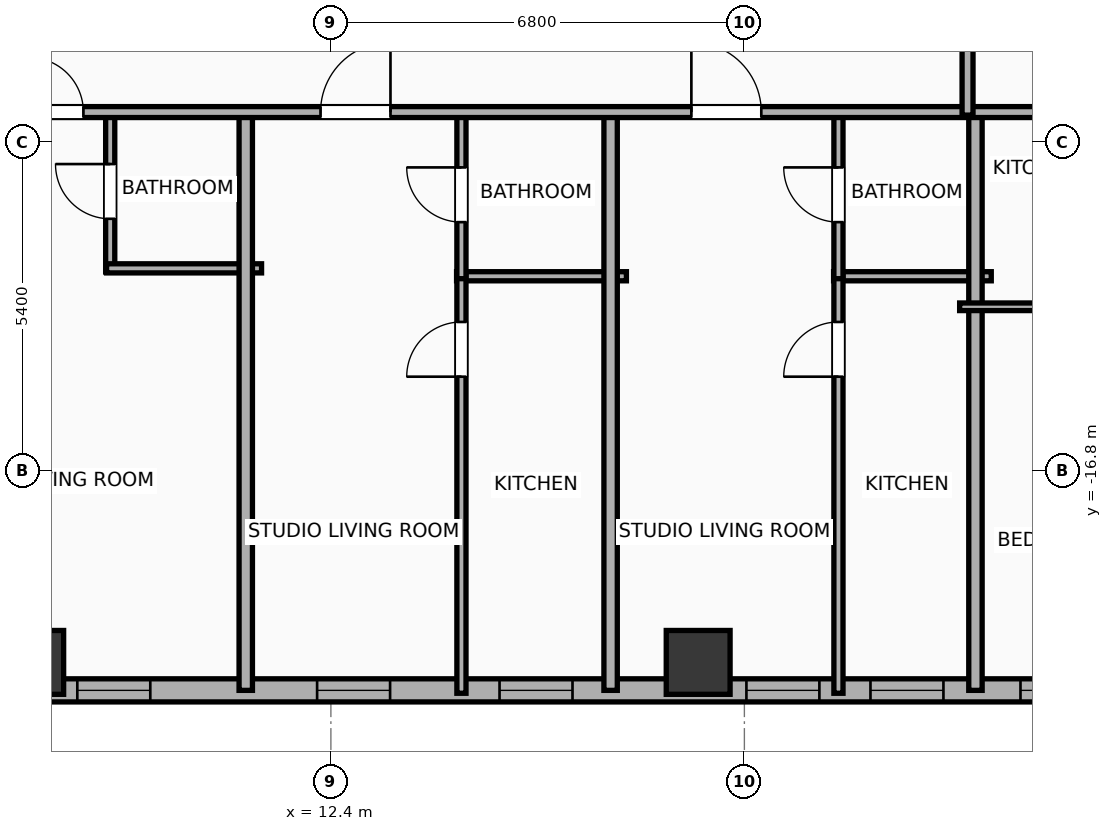
"""IFC4 building model, lengths in metres.
Left out: names, types, materials, properties, quantities, classifications, styles, units other than length and angle.
Written with IfcOpenShell. Run it as: python <this file> out.ifc"""

import sys

from ifc_helpers import new_model, si_unit, direction, frame, frame_2d, origin, origin_2d, place, context, subcontext, project, spatial, rectangle, hollow_rectangle, extrude, element, fill, save


model = new_model("IFC4")
c1 = context("Model", 3, precision=1e-05, world=origin(), true_north=direction((0.0, 1.0)))
c2 = subcontext(c1, "Body", "Model", "MODEL_VIEW")
j1 = project(units=[si_unit("LENGTHUNIT", "METRE"), si_unit("PLANEANGLEUNIT", "RADIAN")], contexts=[c1])
p1 = place(None, origin())
s1 = spatial("IfcSite", under=j1, at=p1, CompositionType="ELEMENT")
p2 = place(p1, origin())
s2 = spatial("IfcBuilding", under=s1, at=p2, CompositionType="ELEMENT")
p3 = place(p2, frame((0.0, 0.0, 89.7)))
s3 = spatial("IfcBuildingStorey", under=s2, at=p3, CompositionType="ELEMENT", Elevation=89.7)
for number, where, z_axis, x_axis in (
    (1, (7.48, -19.95, 0.0), (0.0, 0.0, 1.0), (1.0, 0.0, 0.0)),
    (2, (18.44, -19.95, 0.0), (0.0, 0.0, 1.0), (1.0, 0.0, 0.0)),
):
    element("IfcColumn", number, at=place(p3, frame(where, z_axis=z_axis, x_axis=x_axis)), inside=s3, PredefinedType="COLUMN", context=c2, shape_type="SweptSolid", body=[
        extrude(hollow_rectangle(XDim=1.05, YDim=1.05, WallThickness=0.036, at=origin_2d()), origin(), (0.0, 0.0, 1.0), 3.9),
    ])
p4 = place(p3, frame((29.381, -20.41, 0.0), z_axis=(0.0, 0.0, 1.0), x_axis=(-1.0, 0.0, 0.0)))
e3 = element("IfcWall", 3, at=p4, inside=s3, PredefinedType="ELEMENTEDWALL", context=c2, shape_type="SweptSolid", body=[
    extrude(rectangle(XDim=54.763, YDim=0.38, at=frame_2d((27.381, 0.0))), origin(), (0.0, 0.0, 1.0), 2.54),
])
p5 = place(p4, frame((48.367, 0.0, 0.75)))
e4 = element("IfcOpeningElement", 4, at=p5, cuts=e3, PredefinedType="OPENING", context=c2, shape_type="SweptSolid", body=[
    extrude(rectangle(XDim=2.4, YDim=1.63, at=frame_2d((1.2, 0.815))), frame((0.0, 0.2, 0.0), z_axis=(0.0, -1.0, 0.0), x_axis=(1.0, 0.0, 0.0)), (0.0, 0.0, 1.0), 0.4),
])
p6 = place(p4, frame((52.081, 0.0, 0.75)))
e5 = element("IfcOpeningElement", 5, at=p6, cuts=e3, PredefinedType="OPENING", context=c2, shape_type="SweptSolid", body=[
    extrude(rectangle(XDim=1.2, YDim=1.63, at=frame_2d((0.6, 0.815))), frame((0.0, 0.2, 0.0), z_axis=(0.0, -1.0, 0.0), x_axis=(1.0, 0.0, 0.0)), (0.0, 0.0, 1.0), 0.4),
])
p7 = place(p4, frame((45.486, 0.0, 0.75)))
e6 = element("IfcOpeningElement", 6, at=p7, cuts=e3, PredefinedType="OPENING", context=c2, shape_type="SweptSolid", body=[
    extrude(rectangle(XDim=1.2, YDim=1.63, at=frame_2d((0.6, 0.815))), frame((0.0, 0.2, 0.0), z_axis=(0.0, -1.0, 0.0), x_axis=(1.0, 0.0, 0.0)), (0.0, 0.0, 1.0), 0.4),
])
p8 = place(p4, frame((40.531, 0.0, 0.75)))
e7 = element("IfcOpeningElement", 7, at=p8, cuts=e3, PredefinedType="OPENING", context=c2, shape_type="SweptSolid", body=[
    extrude(rectangle(XDim=1.2, YDim=1.63, at=frame_2d((0.6, 0.815))), frame((0.0, 0.2, 0.0), z_axis=(0.0, -1.0, 0.0), x_axis=(1.0, 0.0, 0.0)), (0.0, 0.0, 1.0), 0.4),
])
p9 = place(p4, frame((33.686, 0.0, 0.75)))
e8 = element("IfcOpeningElement", 8, at=p9, cuts=e3, PredefinedType="OPENING", context=c2, shape_type="SweptSolid", body=[
    extrude(rectangle(XDim=1.2, YDim=1.63, at=frame_2d((0.6, 0.815))), frame((0.0, 0.2, 0.0), z_axis=(0.0, -1.0, 0.0), x_axis=(1.0, 0.0, 0.0)), (0.0, 0.0, 1.0), 0.4),
])
p10 = place(p4, frame((35.976, 0.0, 0.75)))
e9 = element("IfcOpeningElement", 9, at=p10, cuts=e3, PredefinedType="OPENING", context=c2, shape_type="SweptSolid", body=[
    extrude(rectangle(XDim=1.2, YDim=1.63, at=frame_2d((0.6, 0.815))), frame((0.0, 0.2, 0.0), z_axis=(0.0, -1.0, 0.0), x_axis=(1.0, 0.0, 0.0)), (0.0, 0.0, 1.0), 0.4),
])
p11 = place(p4, frame((28.805, 0.0, 0.75)))
e10 = element("IfcOpeningElement", 10, at=p11, cuts=e3, PredefinedType="OPENING", context=c2, shape_type="SweptSolid", body=[
    extrude(rectangle(XDim=1.2, YDim=1.63, at=frame_2d((0.6, 0.815))), frame((0.0, 0.2, 0.0), z_axis=(0.0, -1.0, 0.0), x_axis=(1.0, 0.0, 0.0)), (0.0, 0.0, 1.0), 0.4),
])
p12 = place(p4, frame((25.555, 0.0, 0.75)))
e11 = element("IfcOpeningElement", 11, at=p12, cuts=e3, PredefinedType="OPENING", context=c2, shape_type="SweptSolid", body=[
    extrude(rectangle(XDim=1.2, YDim=1.63, at=frame_2d((0.6, 0.815))), frame((0.0, 0.2, 0.0), z_axis=(0.0, -1.0, 0.0), x_axis=(1.0, 0.0, 0.0)), (0.0, 0.0, 1.0), 0.4),
])
p13 = place(p4, frame((19.951, 0.0, 0.75)))
e12 = element("IfcOpeningElement", 12, at=p13, cuts=e3, PredefinedType="OPENING", context=c2, shape_type="SweptSolid", body=[
    extrude(rectangle(XDim=1.2, YDim=1.63, at=frame_2d((0.6, 0.815))), frame((0.0, 0.2, 0.0), z_axis=(0.0, -1.0, 0.0), x_axis=(1.0, 0.0, 0.0)), (0.0, 0.0, 1.0), 0.4),
])
p14 = place(p4, frame((16.008, 0.0, 0.75)))
e13 = element("IfcOpeningElement", 13, at=p14, cuts=e3, PredefinedType="OPENING", context=c2, shape_type="SweptSolid", body=[
    extrude(rectangle(XDim=1.2, YDim=1.63, at=frame_2d((0.6, 0.815))), frame((0.0, 0.2, 0.0), z_axis=(0.0, -1.0, 0.0), x_axis=(1.0, 0.0, 0.0)), (0.0, 0.0, 1.0), 0.4),
])
p15 = place(p4, frame((13.008, 0.0, 0.75)))
e14 = element("IfcOpeningElement", 14, at=p15, cuts=e3, PredefinedType="OPENING", context=c2, shape_type="SweptSolid", body=[
    extrude(rectangle(XDim=1.2, YDim=1.63, at=frame_2d((0.6, 0.815))), frame((0.0, 0.2, 0.0), z_axis=(0.0, -1.0, 0.0), x_axis=(1.0, 0.0, 0.0)), (0.0, 0.0, 1.0), 0.4),
])
p16 = place(p4, frame((8.948, 0.0, 0.75)))
e15 = element("IfcOpeningElement", 15, at=p16, cuts=e3, PredefinedType="OPENING", context=c2, shape_type="SweptSolid", body=[
    extrude(rectangle(XDim=1.2, YDim=1.63, at=frame_2d((0.6, 0.815))), frame((0.0, 0.2, 0.0), z_axis=(0.0, -1.0, 0.0), x_axis=(1.0, 0.0, 0.0)), (0.0, 0.0, 1.0), 0.4),
])
p17 = place(p4, frame((6.908, 0.0, 0.75)))
e16 = element("IfcOpeningElement", 16, at=p17, cuts=e3, PredefinedType="OPENING", context=c2, shape_type="SweptSolid", body=[
    extrude(rectangle(XDim=1.2, YDim=1.63, at=frame_2d((0.6, 0.815))), frame((0.0, 0.2, 0.0), z_axis=(0.0, -1.0, 0.0), x_axis=(1.0, 0.0, 0.0)), (0.0, 0.0, 1.0), 0.4),
])
p18 = place(p4, frame((1.695, 0.0, 0.75)))
e17 = element("IfcOpeningElement", 17, at=p18, cuts=e3, PredefinedType="OPENING", context=c2, shape_type="SweptSolid", body=[
    extrude(rectangle(XDim=1.2, YDim=1.63, at=frame_2d((0.6, 0.815))), frame((0.0, 0.2, 0.0), z_axis=(0.0, -1.0, 0.0), x_axis=(1.0, 0.0, 0.0)), (0.0, 0.0, 1.0), 0.4),
])
p19 = place(p4, frame((4.441, 0.0, 0.75)))
e18 = element("IfcOpeningElement", 18, at=p19, cuts=e3, PredefinedType="OPENING", context=c2, shape_type="SweptSolid", body=[
    extrude(rectangle(XDim=1.2, YDim=1.63, at=frame_2d((0.6, 0.815))), frame((0.0, 0.2, 0.0), z_axis=(0.0, -1.0, 0.0), x_axis=(1.0, 0.0, 0.0)), (0.0, 0.0, 1.0), 0.4),
])
p20 = place(p3, frame((8.771, -13.53, 0.0), z_axis=(0.0, 0.0, 1.0), x_axis=(0.0, 1.0, 0.0)))
e19 = element("IfcWall", 19, at=p20, inside=s3, PredefinedType="PLUMBINGWALL", context=c2, shape_type="SweptSolid", body=[
    extrude(rectangle(XDim=2.65, YDim=0.15, at=frame_2d((1.325, 0.0))), origin(), (0.0, 0.0, 1.0), 3.65),
])
p21 = place(p20, frame((0.875, 0.0, 0.0)))
e20 = element("IfcOpeningElement", 20, at=p21, cuts=e19, PredefinedType="OPENING", context=c2, shape_type="SweptSolid", body=[
    extrude(rectangle(XDim=0.9, YDim=2.05, at=frame_2d((0.45, 1.025))), frame((0.0, 0.085, 0.0), z_axis=(0.0, -1.0, 0.0), x_axis=(1.0, 0.0, 0.0)), (0.0, 0.0, 1.0), 0.17),
])
p22 = place(p3, frame((8.711, -13.47, 0.0), z_axis=(0.0, 0.0, 1.0), x_axis=(1.0, 0.0, 0.0)))
e21 = element("IfcWall", 21, at=p22, inside=s3, PredefinedType="PLUMBINGWALL", context=c2, shape_type="SweptSolid", body=[
    extrude(rectangle(XDim=2.549, YDim=0.15, at=frame_2d((1.274, 0.0))), origin(), (0.0, 0.0, 1.0), 3.65),
])
p23 = place(p3, frame((11.0, -20.41, 0.0), z_axis=(0.0, 0.0, 1.0), x_axis=(0.0, 1.0, 0.0)))
e22 = element("IfcWall", 22, at=p23, inside=s3, PredefinedType="PARTITIONING", context=c2, shape_type="SweptSolid", body=[
    extrude(rectangle(XDim=9.59, YDim=0.22, at=frame_2d((4.795, 0.0))), origin(), (0.0, 0.0, 1.0), 3.65),
])
p24 = place(p3, frame((14.467, -13.6, 0.0), z_axis=(0.0, 0.0, 1.0), x_axis=(1.0, 0.0, 0.0)))
e23 = element("IfcWall", 23, at=p24, inside=s3, PredefinedType="PLUMBINGWALL", context=c2, shape_type="SweptSolid", body=[
    extrude(rectangle(XDim=2.793, YDim=0.15, at=frame_2d((1.396, 0.0))), origin(), (0.0, 0.0, 1.0), 3.65),
])
p25 = place(p3, frame((14.547, -20.458, 0.0), z_axis=(0.0, 0.0, 1.0), x_axis=(0.0, 1.0, 0.0)))
e24 = element("IfcWall", 24, at=p25, inside=s3, PredefinedType="PLUMBINGWALL", context=c2, shape_type="SweptSolid", body=[
    extrude(rectangle(XDim=6.897, YDim=0.15, at=frame_2d((3.449, 0.0))), origin(), (0.0, 0.0, 1.0), 3.65),
])
p26 = place(p25, frame((5.206, 0.0, 0.0)))
e25 = element("IfcOpeningElement", 25, at=p26, cuts=e24, PredefinedType="OPENING", context=c2, shape_type="SweptSolid", body=[
    extrude(rectangle(XDim=0.9, YDim=2.05, at=frame_2d((0.45, 1.025))), frame((0.0, 0.085, 0.0), z_axis=(0.0, -1.0, 0.0), x_axis=(1.0, 0.0, 0.0)), (0.0, 0.0, 1.0), 0.17),
])
p27 = place(p3, frame((14.547, -13.64, 0.0), z_axis=(0.0, 0.0, 1.0), x_axis=(0.0, 1.0, 0.0)))
e26 = element("IfcWall", 26, at=p27, inside=s3, PredefinedType="PLUMBINGWALL", context=c2, shape_type="SweptSolid", body=[
    extrude(rectangle(XDim=2.76, YDim=0.15, at=frame_2d((1.38, 0.0))), origin(), (0.0, 0.0, 1.0), 3.65),
])
p28 = place(p27, frame((0.93, 0.0, 0.0)))
e27 = element("IfcOpeningElement", 27, at=p28, cuts=e26, PredefinedType="OPENING", context=c2, shape_type="SweptSolid", body=[
    extrude(rectangle(XDim=0.9, YDim=2.05, at=frame_2d((0.45, 1.025))), frame((0.0, 0.085, 0.0), z_axis=(0.0, -1.0, 0.0), x_axis=(1.0, 0.0, 0.0)), (0.0, 0.0, 1.0), 0.17),
])
p29 = place(p3, frame((17.0, -20.41, 0.0), z_axis=(0.0, 0.0, 1.0), x_axis=(0.0, 1.0, 0.0)))
e28 = element("IfcWall", 28, at=p29, inside=s3, PredefinedType="PARTITIONING", context=c2, shape_type="SweptSolid", body=[
    extrude(rectangle(XDim=9.59, YDim=0.22, at=frame_2d((4.795, 0.0))), origin(), (0.0, 0.0, 1.0), 3.65),
])
p30 = place(p3, frame((20.667, -13.6, 0.0), z_axis=(0.0, 0.0, 1.0), x_axis=(1.0, 0.0, 0.0)))
e29 = element("IfcWall", 29, at=p30, inside=s3, PredefinedType="PLUMBINGWALL", context=c2, shape_type="SweptSolid", body=[
    extrude(rectangle(XDim=2.593, YDim=0.15, at=frame_2d((1.296, 0.0))), origin(), (0.0, 0.0, 1.0), 3.65),
])
p31 = place(p3, frame((20.747, -20.458, 0.0), z_axis=(0.0, 0.0, 1.0), x_axis=(0.0, 1.0, 0.0)))
e30 = element("IfcWall", 30, at=p31, inside=s3, PredefinedType="PLUMBINGWALL", context=c2, shape_type="SweptSolid", body=[
    extrude(rectangle(XDim=6.897, YDim=0.15, at=frame_2d((3.449, 0.0))), origin(), (0.0, 0.0, 1.0), 3.65),
])
p32 = place(p31, frame((5.206, 0.0, 0.0)))
e31 = element("IfcOpeningElement", 31, at=p32, cuts=e30, PredefinedType="OPENING", context=c2, shape_type="SweptSolid", body=[
    extrude(rectangle(XDim=0.9, YDim=2.05, at=frame_2d((0.45, 1.025))), frame((0.0, 0.085, 0.0), z_axis=(0.0, -1.0, 0.0), x_axis=(1.0, 0.0, 0.0)), (0.0, 0.0, 1.0), 0.17),
])
p33 = place(p3, frame((20.747, -13.64, 0.0), z_axis=(0.0, 0.0, 1.0), x_axis=(0.0, 1.0, 0.0)))
e32 = element("IfcWall", 32, at=p33, inside=s3, PredefinedType="PLUMBINGWALL", context=c2, shape_type="SweptSolid", body=[
    extrude(rectangle(XDim=2.76, YDim=0.15, at=frame_2d((1.38, 0.0))), origin(), (0.0, 0.0, 1.0), 3.65),
])
p34 = place(p33, frame((0.93, 0.0, 0.0)))
e33 = element("IfcOpeningElement", 33, at=p34, cuts=e32, PredefinedType="OPENING", context=c2, shape_type="SweptSolid", body=[
    extrude(rectangle(XDim=0.9, YDim=2.05, at=frame_2d((0.45, 1.025))), frame((0.0, 0.085, 0.0), z_axis=(0.0, -1.0, 0.0), x_axis=(1.0, 0.0, 0.0)), (0.0, 0.0, 1.0), 0.17),
])
p35 = place(p3, frame((23.0, -20.41, 0.0), z_axis=(0.0, 0.0, 1.0), x_axis=(0.0, 1.0, 0.0)))
e34 = element("IfcWall", 34, at=p35, inside=s3, PredefinedType="PARTITIONING", context=c2, shape_type="SweptSolid", body=[
    extrude(rectangle(XDim=9.59, YDim=0.22, at=frame_2d((4.795, 0.0))), origin(), (0.0, 0.0, 1.0), 3.65),
])
p36 = place(p3, frame((22.74, -14.102, 0.0), z_axis=(0.0, 0.0, 1.0), x_axis=(1.0, 0.0, 0.0)))
e35 = element("IfcWall", 35, at=p36, inside=s3, PredefinedType="PARTITIONING", context=c2, shape_type="SweptSolid", body=[
    extrude(rectangle(XDim=3.122, YDim=0.125, at=frame_2d((1.561, 0.0))), origin(), (0.0, 0.0, 1.0), 3.65),
])
p37 = place(p3, frame((-29.21, -10.9, 0.0), z_axis=(0.0, 0.0, 1.0), x_axis=(1.0, 0.0, 0.0)))
e36 = element("IfcWall", 36, at=p37, inside=s3, PredefinedType="PARTITIONING", context=c2, shape_type="SweptSolid", body=[
    extrude(rectangle(XDim=62.42, YDim=0.18, at=frame_2d((31.21, 0.0))), origin(), (0.0, 0.0, 1.0), 3.65),
])
p38 = place(p37, frame((3.108, 0.0, 0.0)))
e37 = element("IfcOpeningElement", 37, at=p38, cuts=e36, PredefinedType="OPENING", context=c2, shape_type="SweptSolid", body=[
    extrude(rectangle(XDim=1.15, YDim=2.05, at=frame_2d((0.575, 1.025))), frame((0.0, 0.1, 0.0), z_axis=(0.0, -1.0, 0.0), x_axis=(1.0, 0.0, 0.0)), (0.0, 0.0, 1.0), 0.2),
])
p39 = place(p37, frame((10.242, 0.0, 0.0)))
e38 = element("IfcOpeningElement", 38, at=p39, cuts=e36, PredefinedType="OPENING", context=c2, shape_type="SweptSolid", body=[
    extrude(rectangle(XDim=1.15, YDim=2.05, at=frame_2d((0.575, 1.025))), frame((0.0, 0.1, 0.0), z_axis=(0.0, -1.0, 0.0), x_axis=(1.0, 0.0, 0.0)), (0.0, 0.0, 1.0), 0.2),
])
p40 = place(p37, frame((17.14, 0.0, 0.0)))
e39 = element("IfcOpeningElement", 39, at=p40, cuts=e36, PredefinedType="OPENING", context=c2, shape_type="SweptSolid", body=[
    extrude(rectangle(XDim=0.9, YDim=2.05, at=frame_2d((0.45, 1.025))), frame((0.0, 0.1, 0.0), z_axis=(0.0, -1.0, 0.0), x_axis=(1.0, 0.0, 0.0)), (0.0, 0.0, 1.0), 0.2),
])
p41 = place(p37, frame((24.661, 0.0, 0.0)))
e40 = element("IfcOpeningElement", 40, at=p41, cuts=e36, PredefinedType="OPENING", context=c2, shape_type="SweptSolid", body=[
    extrude(rectangle(XDim=1.15, YDim=2.05, at=frame_2d((0.575, 1.025))), frame((0.0, 0.1, 0.0), z_axis=(0.0, -1.0, 0.0), x_axis=(1.0, 0.0, 0.0)), (0.0, 0.0, 1.0), 0.2),
])
p42 = place(p37, frame((28.644, 0.0, 0.0)))
e41 = element("IfcOpeningElement", 41, at=p42, cuts=e36, PredefinedType="OPENING", context=c2, shape_type="SweptSolid", body=[
    extrude(rectangle(XDim=1.15, YDim=2.05, at=frame_2d((0.575, 1.025))), frame((0.0, 0.1, 0.0), z_axis=(0.0, -1.0, 0.0), x_axis=(1.0, 0.0, 0.0)), (0.0, 0.0, 1.0), 0.2),
])
p43 = place(p37, frame((36.64, 0.0, 0.0)))
e42 = element("IfcOpeningElement", 42, at=p43, cuts=e36, PredefinedType="OPENING", context=c2, shape_type="SweptSolid", body=[
    extrude(rectangle(XDim=0.9, YDim=2.05, at=frame_2d((0.45, 1.025))), frame((0.0, 0.1, 0.0), z_axis=(0.0, -1.0, 0.0), x_axis=(1.0, 0.0, 0.0)), (0.0, 0.0, 1.0), 0.2),
])
p44 = place(p37, frame((41.44, 0.0, 0.0)))
e43 = element("IfcOpeningElement", 43, at=p44, cuts=e36, PredefinedType="OPENING", context=c2, shape_type="SweptSolid", body=[
    extrude(rectangle(XDim=1.15, YDim=2.05, at=frame_2d((0.575, 1.025))), frame((0.0, 0.1, 0.0), z_axis=(0.0, -1.0, 0.0), x_axis=(1.0, 0.0, 0.0)), (0.0, 0.0, 1.0), 0.2),
])
p45 = place(p37, frame((47.538, 0.0, 0.0)))
e44 = element("IfcOpeningElement", 44, at=p45, cuts=e36, PredefinedType="OPENING", context=c2, shape_type="SweptSolid", body=[
    extrude(rectangle(XDim=1.15, YDim=2.05, at=frame_2d((0.575, 1.025))), frame((0.0, 0.1, 0.0), z_axis=(0.0, -1.0, 0.0), x_axis=(1.0, 0.0, 0.0)), (0.0, 0.0, 1.0), 0.2),
])
p46 = place(p37, frame((57.157, 0.0, 0.0)))
e45 = element("IfcOpeningElement", 45, at=p46, cuts=e36, PredefinedType="OPENING", context=c2, shape_type="SweptSolid", body=[
    extrude(rectangle(XDim=1.15, YDim=2.05, at=frame_2d((0.575, 1.025))), frame((0.0, 0.1, 0.0), z_axis=(0.0, -1.0, 0.0), x_axis=(1.0, 0.0, 0.0)), (0.0, 0.0, 1.0), 0.2),
])
p47 = place(p3, frame((22.87, -10.95, 0.0), z_axis=(0.0, 0.0, 1.0), x_axis=(0.0, 1.0, 0.0)))
e46 = element("IfcWall", 46, at=p47, inside=s3, PredefinedType="PARTITIONING", context=c2, shape_type="SweptSolid", body=[
    extrude(rectangle(XDim=21.9, YDim=0.18, at=frame_2d((10.95, 0.0))), origin(), (0.0, 0.0, 1.0), 3.65),
])
p48 = place(p47, frame((19.015, 0.0, 0.0)))
e47 = element("IfcOpeningElement", 47, at=p48, cuts=e46, PredefinedType="OPENING", context=c2, shape_type="SweptSolid", body=[
    extrude(rectangle(XDim=0.95, YDim=2.05, at=frame_2d((0.475, 1.025))), frame((0.0, 0.1, 0.0), z_axis=(0.0, -1.0, 0.0), x_axis=(1.0, 0.0, 0.0)), (0.0, 0.0, 1.0), 0.2),
])
p49 = place(p13, origin())
e48 = element("IfcWindow", 48, at=p49, inside=s3, PartitioningType="SINGLE_PANEL", PredefinedType="WINDOW", context=c2, shape_type="SweptSolid", body=[
    extrude(rectangle(XDim=1.2, YDim=1.63, at=frame_2d((0.6, 0.815))), frame((0.0, 0.03, 0.0), z_axis=(0.0, -1.0, 0.0), x_axis=(1.0, 0.0, 0.0)), (0.0, 0.0, 1.0), 0.06),
])
fill(e12, e48)
p50 = place(p14, origin())
e49 = element("IfcWindow", 49, at=p50, inside=s3, PartitioningType="SINGLE_PANEL", PredefinedType="WINDOW", context=c2, shape_type="SweptSolid", body=[
    extrude(rectangle(XDim=1.2, YDim=1.63, at=frame_2d((0.6, 0.815))), frame((0.0, 0.03, 0.0), z_axis=(0.0, -1.0, 0.0), x_axis=(1.0, 0.0, 0.0)), (0.0, 0.0, 1.0), 0.06),
])
fill(e13, e49)
p51 = place(p15, origin())
e50 = element("IfcWindow", 50, at=p51, inside=s3, PartitioningType="SINGLE_PANEL", PredefinedType="WINDOW", context=c2, shape_type="SweptSolid", body=[
    extrude(rectangle(XDim=1.2, YDim=1.63, at=frame_2d((0.6, 0.815))), frame((0.0, 0.03, 0.0), z_axis=(0.0, -1.0, 0.0), x_axis=(1.0, 0.0, 0.0)), (0.0, 0.0, 1.0), 0.06),
])
fill(e14, e50)
p52 = place(p16, origin())
e51 = element("IfcWindow", 51, at=p52, inside=s3, PartitioningType="SINGLE_PANEL", PredefinedType="WINDOW", context=c2, shape_type="SweptSolid", body=[
    extrude(rectangle(XDim=1.2, YDim=1.63, at=frame_2d((0.6, 0.815))), frame((0.0, 0.03, 0.0), z_axis=(0.0, -1.0, 0.0), x_axis=(1.0, 0.0, 0.0)), (0.0, 0.0, 1.0), 0.06),
])
fill(e15, e51)
p53 = place(p17, origin())
e52 = element("IfcWindow", 52, at=p53, inside=s3, PartitioningType="SINGLE_PANEL", PredefinedType="WINDOW", context=c2, shape_type="SweptSolid", body=[
    extrude(rectangle(XDim=1.2, YDim=1.63, at=frame_2d((0.6, 0.815))), frame((0.0, 0.03, 0.0), z_axis=(0.0, -1.0, 0.0), x_axis=(1.0, 0.0, 0.0)), (0.0, 0.0, 1.0), 0.06),
])
fill(e16, e52)
p54 = place(p19, origin())
e53 = element("IfcWindow", 53, at=p54, inside=s3, PartitioningType="SINGLE_PANEL", PredefinedType="WINDOW", context=c2, shape_type="SweptSolid", body=[
    extrude(rectangle(XDim=1.2, YDim=1.63, at=frame_2d((0.6, 0.815))), frame((0.0, 0.03, 0.0), z_axis=(0.0, -1.0, 0.0), x_axis=(1.0, 0.0, 0.0)), (0.0, 0.0, 1.0), 0.06),
])
fill(e18, e53)
p55 = place(p21, origin())
e54 = element("IfcDoor", 54, at=p55, inside=s3, OperationType="SINGLE_SWING_RIGHT", PredefinedType="DOOR", context=c2, shape_type="SweptSolid", body=[
    extrude(rectangle(XDim=0.9, YDim=2.05, at=frame_2d((0.45, 1.025))), frame((0.0, 0.025, 0.0), z_axis=(0.0, -1.0, 0.0), x_axis=(1.0, 0.0, 0.0)), (0.0, 0.0, 1.0), 0.05),
])
fill(e20, e54)
p56 = place(p26, origin())
e55 = element("IfcDoor", 55, at=p56, inside=s3, OperationType="SINGLE_SWING_LEFT", PredefinedType="DOOR", context=c2, shape_type="SweptSolid", body=[
    extrude(rectangle(XDim=0.9, YDim=2.05, at=frame_2d((0.45, 1.025))), frame((0.0, 0.025, 0.0), z_axis=(0.0, -1.0, 0.0), x_axis=(1.0, 0.0, 0.0)), (0.0, 0.0, 1.0), 0.05),
])
fill(e25, e55)
p57 = place(p28, origin())
e56 = element("IfcDoor", 56, at=p57, inside=s3, OperationType="SINGLE_SWING_RIGHT", PredefinedType="DOOR", context=c2, shape_type="SweptSolid", body=[
    extrude(rectangle(XDim=0.9, YDim=2.05, at=frame_2d((0.45, 1.025))), frame((0.0, 0.025, 0.0), z_axis=(0.0, -1.0, 0.0), x_axis=(1.0, 0.0, 0.0)), (0.0, 0.0, 1.0), 0.05),
])
fill(e27, e56)
p58 = place(p32, origin())
e57 = element("IfcDoor", 57, at=p58, inside=s3, OperationType="SINGLE_SWING_LEFT", PredefinedType="DOOR", context=c2, shape_type="SweptSolid", body=[
    extrude(rectangle(XDim=0.9, YDim=2.05, at=frame_2d((0.45, 1.025))), frame((0.0, 0.025, 0.0), z_axis=(0.0, -1.0, 0.0), x_axis=(1.0, 0.0, 0.0)), (0.0, 0.0, 1.0), 0.05),
])
fill(e31, e57)
p59 = place(p34, origin())
e58 = element("IfcDoor", 58, at=p59, inside=s3, OperationType="SINGLE_SWING_RIGHT", PredefinedType="DOOR", context=c2, shape_type="SweptSolid", body=[
    extrude(rectangle(XDim=0.9, YDim=2.05, at=frame_2d((0.45, 1.025))), frame((0.0, 0.025, 0.0), z_axis=(0.0, -1.0, 0.0), x_axis=(1.0, 0.0, 0.0)), (0.0, 0.0, 1.0), 0.05),
])
fill(e33, e58)
p60 = place(p43, origin())
e59 = element("IfcDoor", 59, at=p60, inside=s3, OperationType="SINGLE_SWING_LEFT", PredefinedType="DOOR", context=c2, shape_type="SweptSolid", body=[
    extrude(rectangle(XDim=0.9, YDim=2.05, at=frame_2d((0.45, 1.025))), frame((0.0, 0.025, 0.0), z_axis=(0.0, -1.0, 0.0), x_axis=(1.0, 0.0, 0.0)), (0.0, 0.0, 1.0), 0.05),
])
fill(e42, e59)
p61 = place(p44, origin())
e60 = element("IfcDoor", 60, at=p61, inside=s3, OperationType="SINGLE_SWING_RIGHT", PredefinedType="DOOR", context=c2, shape_type="SweptSolid", body=[
    extrude(rectangle(XDim=1.15, YDim=2.05, at=frame_2d((0.575, 1.025))), frame((0.0, 0.025, 0.0), z_axis=(0.0, -1.0, 0.0), x_axis=(1.0, 0.0, 0.0)), (0.0, 0.0, 1.0), 0.05),
])
fill(e43, e60)
p62 = place(p45, origin())
e61 = element("IfcDoor", 61, at=p62, inside=s3, OperationType="SINGLE_SWING_LEFT", PredefinedType="DOOR", context=c2, shape_type="SweptSolid", body=[
    extrude(rectangle(XDim=1.15, YDim=2.05, at=frame_2d((0.575, 1.025))), frame((0.0, 0.025, 0.0), z_axis=(0.0, -1.0, 0.0), x_axis=(1.0, 0.0, 0.0)), (0.0, 0.0, 1.0), 0.05),
])
fill(e44, e61)
save(model, sys.argv[1])
